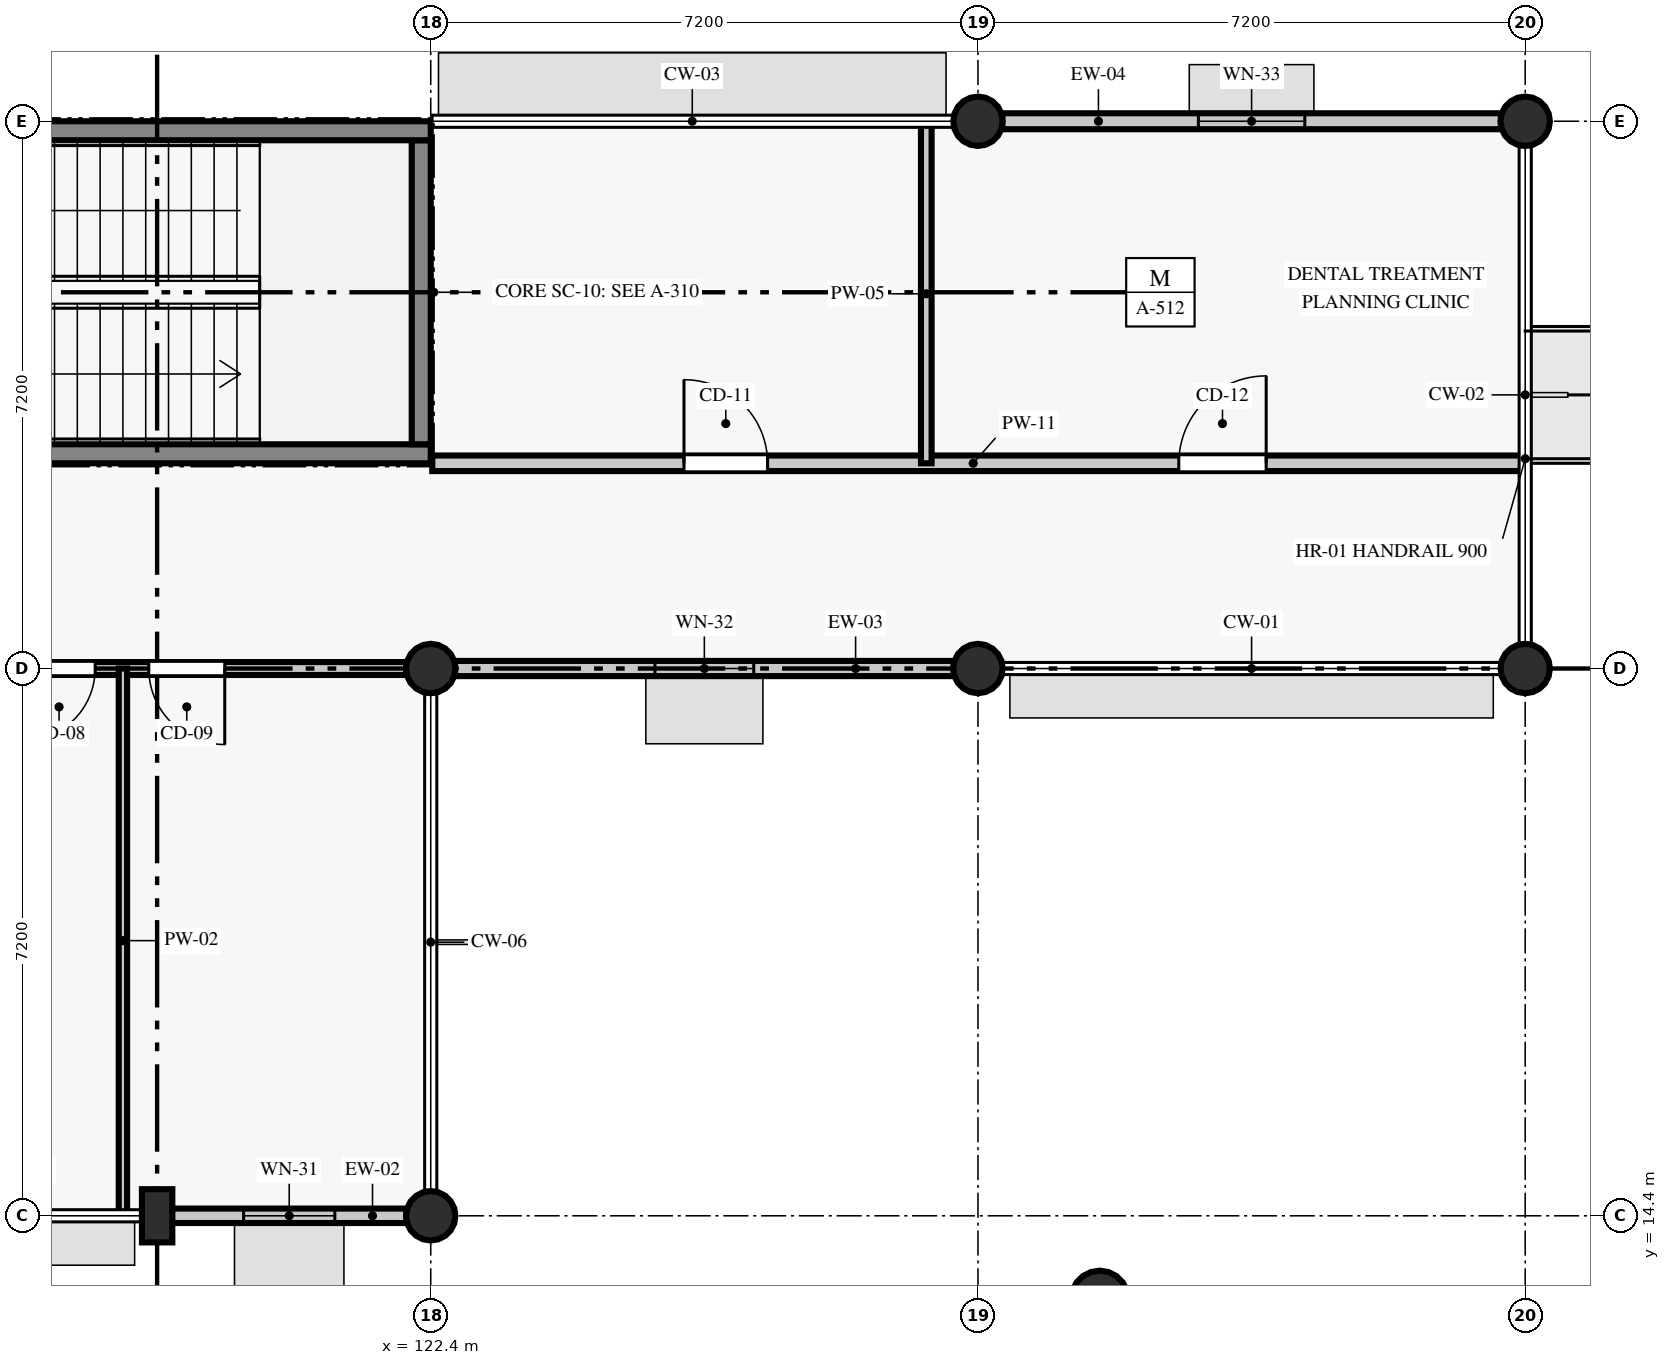
"""IFC4 building model, lengths in metres.
Left out: names, types, materials, properties, quantities, classifications, styles, units other than length and angle.
Written with IfcOpenShell. Run it as: python <this file> out.ifc"""

import sys

from ifc_helpers import new_model, si_unit, direction, frame, frame_2d, origin, origin_2d, place, context, subcontext, project, spatial, rectangle, circle, extrude, element, fill, save


model = new_model("IFC4")
c1 = context("Model", 3, precision=1e-05, world=origin(), true_north=direction((0.0, 1.0)))
c2 = subcontext(c1, "Body", "Model", "MODEL_VIEW")
j1 = project(units=[si_unit("LENGTHUNIT", "METRE"), si_unit("PLANEANGLEUNIT", "RADIAN")], contexts=[c1])
p1 = place(None, origin())
s1 = spatial("IfcSite", under=j1, at=p1, CompositionType="ELEMENT")
p2 = place(p1, origin())
s2 = spatial("IfcBuilding", under=s1, at=p2, CompositionType="ELEMENT")
p3 = place(p2, origin())
s3 = spatial("IfcBuildingStorey", under=s2, at=p3, CompositionType="ELEMENT", Elevation=0.0)
for number, where, z_axis, x_axis in (
    (1, (122.4, 14.4, 0.0), (0.0, 0.0, 1.0), (1.0, 0.0, 0.0)),
    (2, (122.4, 21.6, 0.0), (0.0, 0.0, 1.0), (1.0, 0.0, 0.0)),
    (3, (129.6, 21.6, 0.0), (0.0, 0.0, 1.0), (1.0, 0.0, 0.0)),
    (4, (129.6, 28.8, 0.0), (0.0, 0.0, 1.0), (1.0, 0.0, 0.0)),
    (5, (136.8, 21.6, 0.0), (0.0, 0.0, 1.0), (1.0, 0.0, 0.0)),
    (6, (136.8, 28.8, 0.0), (0.0, 0.0, 1.0), (1.0, 0.0, 0.0)),
):
    element("IfcColumn", number, at=place(p3, frame(where, z_axis=z_axis, x_axis=x_axis)), inside=s3, PredefinedType="COLUMN", context=c2, shape_type="SweptSolid", body=[
        extrude(circle(Radius=0.325, at=origin_2d()), origin(), (0.0, 0.0, 1.0), 4.495),
    ])
p4 = place(p3, frame((118.8, 14.4, 0.0), z_axis=(0.0, 0.0, 1.0), x_axis=(1.0, 0.0, 0.0)))
e7 = element("IfcColumn", 7, at=p4, inside=s3, PredefinedType="PILASTER", context=c2, shape_type="SweptSolid", body=[
    extrude(rectangle(XDim=0.4, YDim=0.7, at=origin_2d()), origin(), (0.0, 0.0, 1.0), 4.495),
])
p5 = place(p3, frame((131.201, 13.303, 0.0), z_axis=(0.0, 0.0, 1.0), x_axis=(1.0, 0.0, 0.0)))
e8 = element("IfcColumn", 8, at=p5, inside=s3, PredefinedType="COLUMN", context=c2, shape_type="SweptSolid", body=[
    extrude(circle(Radius=0.375, at=origin_2d()), origin(), (0.0, 0.0, 1.0), 4.8),
])
p6 = place(p3, frame((118.996, 14.4, 0.0), z_axis=(0.0, 0.0, 1.0), x_axis=(1.0, 0.0, 0.0)))
e9 = element("IfcWall", 9, at=p6, inside=s3, PredefinedType="STANDARD", context=c2, shape_type="SweptSolid", body=[
    extrude(rectangle(XDim=3.084, YDim=0.19, at=frame_2d((1.542, 0.0))), origin(), (0.0, 0.0, 1.0), 3.845),
])
p7 = place(p6, frame((0.942, 0.0, 0.9)))
e10 = element("IfcOpeningElement", 10, at=p7, cuts=e9, PredefinedType="OPENING", context=c2, shape_type="SweptSolid", body=[
    extrude(rectangle(XDim=1.2, YDim=1.66, at=frame_2d((0.6, 0.83))), frame((0.0, 0.105, 0.0), z_axis=(0.0, -1.0, 0.0), x_axis=(1.0, 0.0, 0.0)), (0.0, 0.0, 1.0), 0.21),
])
p8 = place(p3, frame((122.72, 21.6, 0.0), z_axis=(0.0, 0.0, 1.0), x_axis=(1.0, 0.0, 0.0)))
e11 = element("IfcWall", 11, at=p8, inside=s3, PredefinedType="STANDARD", context=c2, shape_type="SweptSolid", body=[
    extrude(rectangle(XDim=6.56, YDim=0.2, at=frame_2d((3.28, 0.0))), origin(), (0.0, 0.0, 1.0), 3.845),
])
p9 = place(p8, frame((2.63, 0.0, 0.9)))
e12 = element("IfcOpeningElement", 12, at=p9, cuts=e11, PredefinedType="OPENING", context=c2, shape_type="SweptSolid", body=[
    extrude(rectangle(XDim=1.3, YDim=1.66, at=frame_2d((0.65, 0.83))), frame((0.0, 0.11, 0.0), z_axis=(0.0, -1.0, 0.0), x_axis=(1.0, 0.0, 0.0)), (0.0, 0.0, 1.0), 0.22),
])
p10 = place(p3, frame((136.48, 28.8, 0.0), z_axis=(0.0, 0.0, 1.0), x_axis=(-1.0, 0.0, 0.0)))
e13 = element("IfcWall", 13, at=p10, inside=s3, PredefinedType="STANDARD", context=c2, shape_type="SweptSolid", body=[
    extrude(rectangle(XDim=6.56, YDim=0.21, at=frame_2d((3.28, 0.0))), origin(), (0.0, 0.0, 1.0), 3.845),
])
p11 = place(p10, frame((2.58, 0.0, 0.9)))
e14 = element("IfcOpeningElement", 14, at=p11, cuts=e13, PredefinedType="OPENING", context=c2, shape_type="SweptSolid", body=[
    extrude(rectangle(XDim=1.4, YDim=1.66, at=frame_2d((0.7, 0.83))), frame((0.0, 0.115, 0.0), z_axis=(0.0, -1.0, 0.0), x_axis=(1.0, 0.0, 0.0)), (0.0, 0.0, 1.0), 0.23),
])
p12 = place(p3, frame((113.6, 24.425, 0.0), z_axis=(0.0, 0.0, 1.0), x_axis=(1.0, 0.0, 0.0)))
e15 = element("IfcWall", 15, at=p12, inside=s3, PredefinedType="SHEAR", context=c2, shape_type="SweptSolid", body=[
    extrude(rectangle(XDim=8.8, YDim=0.25, at=frame_2d((4.4, 0.0))), origin(), (0.0, 0.0, 1.0), 4.495),
])
p13 = place(p12, frame((0.3, 0.0, 0.0)))
e16 = element("IfcOpeningElement", 16, at=p13, cuts=e15, PredefinedType="OPENING", context=c2, shape_type="SweptSolid", body=[
    extrude(rectangle(XDim=1.5, YDim=2.15, at=frame_2d((0.75, 1.075))), frame((0.0, 0.135, 0.0), z_axis=(0.0, -1.0, 0.0), x_axis=(1.0, 0.0, 0.0)), (0.0, 0.0, 1.0), 0.27),
])
p14 = place(p3, frame((122.275, 24.55, 0.0), z_axis=(0.0, 0.0, 1.0), x_axis=(0.0, 1.0, 0.0)))
e17 = element("IfcWall", 17, at=p14, inside=s3, PredefinedType="SHEAR", context=c2, shape_type="SweptSolid", body=[
    extrude(rectangle(XDim=4.0, YDim=0.25, at=frame_2d((2.0, 0.0))), origin(), (0.0, 0.0, 1.0), 4.495),
])
p15 = place(p3, frame((122.4, 28.675, 0.0), z_axis=(0.0, 0.0, 1.0), x_axis=(-1.0, 0.0, 0.0)))
e18 = element("IfcWall", 18, at=p15, inside=s3, PredefinedType="SHEAR", context=c2, shape_type="SweptSolid", body=[
    extrude(rectangle(XDim=8.8, YDim=0.25, at=frame_2d((4.4, 0.0))), origin(), (0.0, 0.0, 1.0), 4.495),
])
p16 = place(p15, frame((6.7, 0.0, 0.0)))
e19 = element("IfcOpeningElement", 19, at=p16, cuts=e18, PredefinedType="OPENING", context=c2, shape_type="SweptSolid", body=[
    extrude(rectangle(XDim=1.85, YDim=2.2, at=frame_2d((0.925, 1.1))), frame((0.0, 0.135, 0.0), z_axis=(0.0, -1.0, 0.0), x_axis=(1.0, 0.0, 0.0)), (0.0, 0.0, 1.0), 0.27),
])
p17 = place(p3, frame((93.925, 21.6, 0.0), z_axis=(0.0, 0.0, 1.0), x_axis=(1.0, 0.0, 0.0)))
e20 = element("IfcWall", 20, at=p17, inside=s3, PredefinedType="PARTITIONING", context=c2, shape_type="SweptSolid", body=[
    extrude(rectangle(XDim=28.15, YDim=0.17, at=frame_2d((14.075, 0.0))), origin(), (0.0, 0.0, 1.0), 3.795),
])
p18 = place(p17, frame((2.768, 0.0, 0.0)))
e21 = element("IfcOpeningElement", 21, at=p18, cuts=e20, PredefinedType="OPENING", context=c2, shape_type="SweptSolid", body=[
    extrude(rectangle(XDim=0.98, YDim=2.08, at=frame_2d((0.49, 1.04))), frame((0.0, 0.095, 0.0), z_axis=(0.0, -1.0, 0.0), x_axis=(1.0, 0.0, 0.0)), (0.0, 0.0, 1.0), 0.19),
])
p19 = place(p17, frame((8.08, 0.0, 0.0)))
e22 = element("IfcOpeningElement", 22, at=p19, cuts=e20, PredefinedType="OPENING", context=c2, shape_type="SweptSolid", body=[
    extrude(rectangle(XDim=1.02, YDim=2.08, at=frame_2d((0.51, 1.04))), frame((0.0, 0.095, 0.0), z_axis=(0.0, -1.0, 0.0), x_axis=(1.0, 0.0, 0.0)), (0.0, 0.0, 1.0), 0.19),
])
p20 = place(p17, frame((9.95, 0.0, 0.0)))
e23 = element("IfcOpeningElement", 23, at=p20, cuts=e20, PredefinedType="OPENING", context=c2, shape_type="SweptSolid", body=[
    extrude(rectangle(XDim=1.54, YDim=2.2, at=frame_2d((0.77, 1.1))), frame((0.0, 0.095, 0.0), z_axis=(0.0, -1.0, 0.0), x_axis=(1.0, 0.0, 0.0)), (0.0, 0.0, 1.0), 0.19),
])
p21 = place(p17, frame((15.055, 0.0, 0.0)))
e24 = element("IfcOpeningElement", 24, at=p21, cuts=e20, PredefinedType="OPENING", context=c2, shape_type="SweptSolid", body=[
    extrude(rectangle(XDim=0.92, YDim=2.18, at=frame_2d((0.46, 1.09))), frame((0.0, 0.095, 0.0), z_axis=(0.0, -1.0, 0.0), x_axis=(1.0, 0.0, 0.0)), (0.0, 0.0, 1.0), 0.19),
])
p22 = place(p17, frame((17.255, 0.0, 0.0)))
e25 = element("IfcOpeningElement", 25, at=p22, cuts=e20, PredefinedType="OPENING", context=c2, shape_type="SweptSolid", body=[
    extrude(rectangle(XDim=0.94, YDim=2.08, at=frame_2d((0.47, 1.04))), frame((0.0, 0.095, 0.0), z_axis=(0.0, -1.0, 0.0), x_axis=(1.0, 0.0, 0.0)), (0.0, 0.0, 1.0), 0.19),
])
p23 = place(p17, frame((19.545, 0.0, 0.0)))
e26 = element("IfcOpeningElement", 26, at=p23, cuts=e20, PredefinedType="OPENING", context=c2, shape_type="SweptSolid", body=[
    extrude(rectangle(XDim=0.9, YDim=2.08, at=frame_2d((0.45, 1.04))), frame((0.0, 0.095, 0.0), z_axis=(0.0, -1.0, 0.0), x_axis=(1.0, 0.0, 0.0)), (0.0, 0.0, 1.0), 0.19),
])
p24 = place(p17, frame((23.11, 0.0, 0.0)))
e27 = element("IfcOpeningElement", 27, at=p24, cuts=e20, PredefinedType="OPENING", context=c2, shape_type="SweptSolid", body=[
    extrude(rectangle(XDim=0.95, YDim=2.13, at=frame_2d((0.475, 1.065))), frame((0.0, 0.095, 0.0), z_axis=(0.0, -1.0, 0.0), x_axis=(1.0, 0.0, 0.0)), (0.0, 0.0, 1.0), 0.19),
])
p25 = place(p17, frame((24.765, 0.0, 0.0)))
e28 = element("IfcOpeningElement", 28, at=p25, cuts=e20, PredefinedType="OPENING", context=c2, shape_type="SweptSolid", body=[
    extrude(rectangle(XDim=1.0, YDim=2.13, at=frame_2d((0.5, 1.065))), frame((0.0, 0.095, 0.0), z_axis=(0.0, -1.0, 0.0), x_axis=(1.0, 0.0, 0.0)), (0.0, 0.0, 1.0), 0.19),
])
p26 = place(p3, frame((118.35, 14.44, 0.0), z_axis=(0.0, 0.0, 1.0), x_axis=(0.0, 1.0, 0.0)))
e29 = element("IfcWall", 29, at=p26, inside=s3, PredefinedType="PARTITIONING", context=c2, shape_type="SweptSolid", body=[
    extrude(rectangle(XDim=7.16, YDim=0.11, at=frame_2d((3.58, 0.0))), origin(), (0.0, 0.0, 1.0), 3.795),
])
p27 = place(p3, frame((122.42, 24.3, 0.0), z_axis=(0.0, 0.0, 1.0), x_axis=(1.0, 0.0, 0.0)))
e30 = element("IfcWall", 30, at=p27, inside=s3, PredefinedType="PARTITIONING", context=c2, shape_type="SweptSolid", body=[
    extrude(rectangle(XDim=14.34, YDim=0.205, at=frame_2d((7.17, 0.0))), origin(), (0.0, 0.0, 1.0), 3.845),
])
p28 = place(p27, frame((3.312, 0.0, 0.0)))
e31 = element("IfcOpeningElement", 31, at=p28, cuts=e30, PredefinedType="OPENING", context=c2, shape_type="SweptSolid", body=[
    extrude(rectangle(XDim=1.1, YDim=2.13, at=frame_2d((0.55, 1.065))), frame((0.0, 0.113, 0.0), z_axis=(0.0, -1.0, 0.0), x_axis=(1.0, 0.0, 0.0)), (0.0, 0.0, 1.0), 0.225),
])
p29 = place(p27, frame((9.822, 0.0, 0.0)))
e32 = element("IfcOpeningElement", 32, at=p29, cuts=e30, PredefinedType="OPENING", context=c2, shape_type="SweptSolid", body=[
    extrude(rectangle(XDim=1.15, YDim=2.13, at=frame_2d((0.575, 1.065))), frame((0.0, 0.113, 0.0), z_axis=(0.0, -1.0, 0.0), x_axis=(1.0, 0.0, 0.0)), (0.0, 0.0, 1.0), 0.225),
])
p30 = place(p3, frame((128.92, 24.3, 0.0), z_axis=(0.0, 0.0, 1.0), x_axis=(0.0, 1.0, 0.0)))
e33 = element("IfcWall", 33, at=p30, inside=s3, PredefinedType="PARTITIONING", context=c2, shape_type="SweptSolid", body=[
    extrude(rectangle(XDim=4.46, YDim=0.14, at=frame_2d((2.23, 0.0))), origin(), (0.0, 0.0, 1.0), 4.495),
])
p31 = place(p7, origin())
e34 = element("IfcWindow", 34, at=p31, inside=s3, PartitioningType="SINGLE_PANEL", PredefinedType="WINDOW", context=c2, shape_type="SweptSolid", body=[
    extrude(rectangle(XDim=1.2, YDim=1.66, at=frame_2d((0.6, 0.83))), frame((0.0, 0.03, 0.0), z_axis=(0.0, -1.0, 0.0), x_axis=(1.0, 0.0, 0.0)), (0.0, 0.0, 1.0), 0.06),
])
fill(e10, e34)
p32 = place(p9, origin())
e35 = element("IfcWindow", 35, at=p32, inside=s3, PartitioningType="SINGLE_PANEL", PredefinedType="WINDOW", context=c2, shape_type="SweptSolid", body=[
    extrude(rectangle(XDim=1.3, YDim=1.66, at=frame_2d((0.65, 0.83))), frame((0.0, 0.03, 0.0), z_axis=(0.0, -1.0, 0.0), x_axis=(1.0, 0.0, 0.0)), (0.0, 0.0, 1.0), 0.06),
])
fill(e12, e35)
p33 = place(p11, origin())
e36 = element("IfcWindow", 36, at=p33, inside=s3, PartitioningType="SINGLE_PANEL", PredefinedType="WINDOW", context=c2, shape_type="SweptSolid", body=[
    extrude(rectangle(XDim=1.4, YDim=1.66, at=frame_2d((0.7, 0.83))), frame((0.0, 0.03, 0.0), z_axis=(0.0, -1.0, 0.0), x_axis=(1.0, 0.0, 0.0)), (0.0, 0.0, 1.0), 0.06),
])
fill(e14, e36)
p34 = place(p24, frame((0.95, 0.0, 0.0), z_axis=(0.0, 0.0, 1.0), x_axis=(-1.0, 0.0, 0.0)))
e37 = element("IfcDoor", 37, at=p34, inside=s3, OperationType="SINGLE_SWING_RIGHT", PredefinedType="DOOR", context=c2, shape_type="SweptSolid", body=[
    extrude(rectangle(XDim=0.95, YDim=2.13, at=frame_2d((0.475, 1.065))), frame((0.0, 0.025, 0.0), z_axis=(0.0, -1.0, 0.0), x_axis=(1.0, 0.0, 0.0)), (0.0, 0.0, 1.0), 0.05),
])
fill(e27, e37)
p35 = place(p25, frame((1.0, 0.0, 0.0), z_axis=(0.0, 0.0, 1.0), x_axis=(-1.0, 0.0, 0.0)))
e38 = element("IfcDoor", 38, at=p35, inside=s3, OperationType="SINGLE_SWING_LEFT", PredefinedType="DOOR", context=c2, shape_type="SweptSolid", body=[
    extrude(rectangle(XDim=1.0, YDim=2.13, at=frame_2d((0.5, 1.065))), frame((0.0, 0.025, 0.0), z_axis=(0.0, -1.0, 0.0), x_axis=(1.0, 0.0, 0.0)), (0.0, 0.0, 1.0), 0.05),
])
fill(e28, e38)
p36 = place(p28, origin())
e39 = element("IfcDoor", 39, at=p36, inside=s3, OperationType="SINGLE_SWING_LEFT", PredefinedType="DOOR", context=c2, shape_type="SweptSolid", body=[
    extrude(rectangle(XDim=1.1, YDim=2.13, at=frame_2d((0.55, 1.065))), frame((0.0, 0.025, 0.0), z_axis=(0.0, -1.0, 0.0), x_axis=(1.0, 0.0, 0.0)), (0.0, 0.0, 1.0), 0.05),
])
fill(e31, e39)
p37 = place(p29, origin())
e40 = element("IfcDoor", 40, at=p37, inside=s3, OperationType="SINGLE_SWING_RIGHT", PredefinedType="DOOR", context=c2, shape_type="SweptSolid", body=[
    extrude(rectangle(XDim=1.15, YDim=2.13, at=frame_2d((0.575, 1.065))), frame((0.0, 0.025, 0.0), z_axis=(0.0, -1.0, 0.0), x_axis=(1.0, 0.0, 0.0)), (0.0, 0.0, 1.0), 0.05),
])
fill(e32, e40)
save(model, sys.argv[1])
